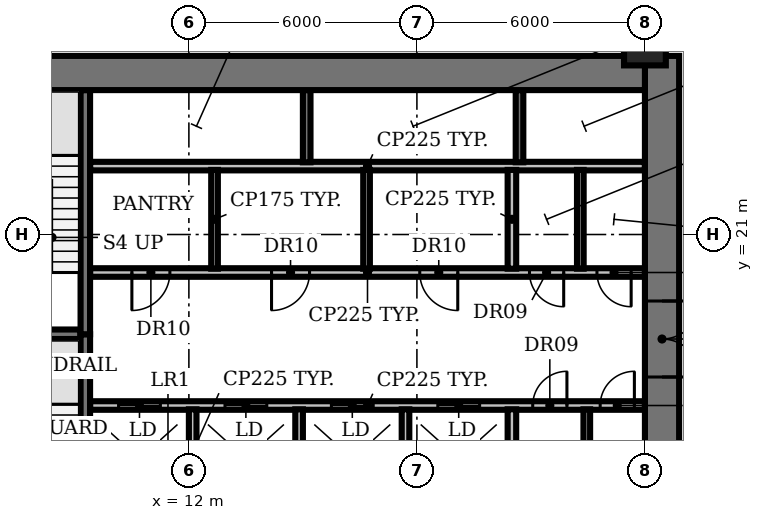
"""IFC4 building model, lengths in metres.
Left out: names, types, materials, properties, quantities, classifications, styles, units other than length and angle.
Written with IfcOpenShell. Run it as: python <this file> out.ifc"""

import sys

from ifc_helpers import new_model, si_unit, direction, frame, frame_2d, origin, origin_2d, place, context, subcontext, project, spatial, rectangle, circle, extrude, element, fill, save


model = new_model("IFC4")
c1 = context("Model", 3, precision=1e-05, world=origin(), true_north=direction((0.0, 1.0)))
c2 = subcontext(c1, "Body", "Model", "MODEL_VIEW")
j1 = project(units=[si_unit("LENGTHUNIT", "METRE"), si_unit("PLANEANGLEUNIT", "RADIAN")], contexts=[c1])
p1 = place(None, origin())
s1 = spatial("IfcSite", under=j1, at=p1, CompositionType="ELEMENT")
p2 = place(p1, origin())
s2 = spatial("IfcBuilding", under=s1, at=p2, CompositionType="ELEMENT")
p3 = place(p2, frame((0.0, 0.0, 20.0)))
s3 = spatial("IfcBuildingStorey", under=s2, at=p3, CompositionType="ELEMENT", Elevation=20.0)
p4 = place(p3, frame((24.0, 26.0, 0.0), z_axis=(0.0, 0.0, 1.0), x_axis=(1.0, 0.0, 0.0)))
e1 = element("IfcColumn", 1, at=p4, inside=s3, PredefinedType="COLUMN", context=c2, shape_type="SweptSolid", body=[
    extrude(circle(Radius=0.55, at=origin_2d()), origin(), (0.0, 0.0, 1.0), 4.15),
])
p5 = place(p3, frame((9.4, 16.5, 0.0), z_axis=(0.0, 0.0, 1.0), x_axis=(1.0, 0.0, 0.0)))
e2 = element("IfcWall", 2, at=p5, inside=s3, PredefinedType="PARTITIONING", context=c2, shape_type="SweptSolid", body=[
    extrude(rectangle(XDim=14.6, YDim=0.225, at=frame_2d((7.3, 0.0))), origin(), (0.0, 0.0, 1.0), 4.15),
])
p6 = place(p5, frame((0.75, 0.0, 0.0)))
e3 = element("IfcOpeningElement", 3, at=p6, cuts=e2, PredefinedType="OPENING", context=c2, shape_type="SweptSolid", body=[
    extrude(rectangle(XDim=1.1, YDim=2.1, at=frame_2d((0.55, 1.05))), frame((0.0, 0.123, 0.0), z_axis=(0.0, -1.0, 0.0), x_axis=(1.0, 0.0, 0.0)), (0.0, 0.0, 1.0), 0.245),
])
p7 = place(p5, frame((3.55, 0.0, 0.0)))
e4 = element("IfcOpeningElement", 4, at=p7, cuts=e2, PredefinedType="OPENING", context=c2, shape_type="SweptSolid", body=[
    extrude(rectangle(XDim=1.1, YDim=2.1, at=frame_2d((0.55, 1.05))), frame((0.0, 0.123, 0.0), z_axis=(0.0, -1.0, 0.0), x_axis=(1.0, 0.0, 0.0)), (0.0, 0.0, 1.0), 0.245),
])
p8 = place(p5, frame((6.35, 0.0, 0.0)))
e5 = element("IfcOpeningElement", 5, at=p8, cuts=e2, PredefinedType="OPENING", context=c2, shape_type="SweptSolid", body=[
    extrude(rectangle(XDim=1.1, YDim=2.1, at=frame_2d((0.55, 1.05))), frame((0.0, 0.123, 0.0), z_axis=(0.0, -1.0, 0.0), x_axis=(1.0, 0.0, 0.0)), (0.0, 0.0, 1.0), 0.245),
])
p9 = place(p5, frame((9.15, 0.0, 0.0)))
e6 = element("IfcOpeningElement", 6, at=p9, cuts=e2, PredefinedType="OPENING", context=c2, shape_type="SweptSolid", body=[
    extrude(rectangle(XDim=1.1, YDim=2.1, at=frame_2d((0.55, 1.05))), frame((0.0, 0.123, 0.0), z_axis=(0.0, -1.0, 0.0), x_axis=(1.0, 0.0, 0.0)), (0.0, 0.0, 1.0), 0.245),
])
p10 = place(p5, frame((11.647, 0.0, 0.0)))
e7 = element("IfcOpeningElement", 7, at=p10, cuts=e2, PredefinedType="OPENING", context=c2, shape_type="SweptSolid", body=[
    extrude(rectangle(XDim=0.9, YDim=2.1, at=frame_2d((0.45, 1.05))), frame((0.0, 0.123, 0.0), z_axis=(0.0, -1.0, 0.0), x_axis=(1.0, 0.0, 0.0)), (0.0, 0.0, 1.0), 0.245),
])
p11 = place(p5, frame((13.423, 0.0, 0.0)))
e8 = element("IfcOpeningElement", 8, at=p11, cuts=e2, PredefinedType="OPENING", context=c2, shape_type="SweptSolid", body=[
    extrude(rectangle(XDim=0.9, YDim=2.1, at=frame_2d((0.45, 1.05))), frame((0.0, 0.123, 0.0), z_axis=(0.0, -1.0, 0.0), x_axis=(1.0, 0.0, 0.0)), (0.0, 0.0, 1.0), 0.245),
])
p12 = place(p3, frame((6.0, 18.375, 0.0), z_axis=(0.0, 0.0, 1.0), x_axis=(1.0, 0.0, 0.0)))
e9 = element("IfcWall", 9, at=p12, inside=s3, PredefinedType="SHEAR", context=c2, shape_type="SweptSolid", body=[
    extrude(rectangle(XDim=3.15, YDim=0.25, at=frame_2d((1.575, 0.0))), origin(), (0.0, 0.0, 1.0), 4.15),
])
p13 = place(p3, frame((24.0, 20.0, 0.0), z_axis=(0.0, 0.0, 1.0), x_axis=(-1.0, 0.0, 0.0)))
e10 = element("IfcWall", 10, at=p13, inside=s3, PredefinedType="PARTITIONING", context=c2, shape_type="SweptSolid", body=[
    extrude(rectangle(XDim=14.6, YDim=0.225, at=frame_2d((7.3, 0.0))), origin(), (0.0, 0.0, 1.0), 4.15),
])
p14 = place(p13, frame((12.5, 0.0, 0.0)))
e11 = element("IfcOpeningElement", 11, at=p14, cuts=e10, PredefinedType="OPENING", context=c2, shape_type="SweptSolid", body=[
    extrude(rectangle(XDim=1.0, YDim=2.1, at=frame_2d((0.5, 1.05))), frame((0.0, 0.123, 0.0), z_axis=(0.0, -1.0, 0.0), x_axis=(1.0, 0.0, 0.0)), (0.0, 0.0, 1.0), 0.245),
])
p15 = place(p13, frame((8.825, 0.0, 0.0)))
e12 = element("IfcOpeningElement", 12, at=p15, cuts=e10, PredefinedType="OPENING", context=c2, shape_type="SweptSolid", body=[
    extrude(rectangle(XDim=1.0, YDim=2.1, at=frame_2d((0.5, 1.05))), frame((0.0, 0.123, 0.0), z_axis=(0.0, -1.0, 0.0), x_axis=(1.0, 0.0, 0.0)), (0.0, 0.0, 1.0), 0.245),
])
p16 = place(p13, frame((4.925, 0.0, 0.0)))
e13 = element("IfcOpeningElement", 13, at=p16, cuts=e10, PredefinedType="OPENING", context=c2, shape_type="SweptSolid", body=[
    extrude(rectangle(XDim=1.0, YDim=2.1, at=frame_2d((0.5, 1.05))), frame((0.0, 0.123, 0.0), z_axis=(0.0, -1.0, 0.0), x_axis=(1.0, 0.0, 0.0)), (0.0, 0.0, 1.0), 0.245),
])
p17 = place(p13, frame((2.137, 0.0, 0.0)))
e14 = element("IfcOpeningElement", 14, at=p17, cuts=e10, PredefinedType="OPENING", context=c2, shape_type="SweptSolid", body=[
    extrude(rectangle(XDim=0.9, YDim=2.1, at=frame_2d((0.45, 1.05))), frame((0.0, 0.123, 0.0), z_axis=(0.0, -1.0, 0.0), x_axis=(1.0, 0.0, 0.0)), (0.0, 0.0, 1.0), 0.245),
])
p18 = place(p13, frame((0.363, 0.0, 0.0)))
e15 = element("IfcOpeningElement", 15, at=p18, cuts=e10, PredefinedType="OPENING", context=c2, shape_type="SweptSolid", body=[
    extrude(rectangle(XDim=0.9, YDim=2.1, at=frame_2d((0.45, 1.05))), frame((0.0, 0.123, 0.0), z_axis=(0.0, -1.0, 0.0), x_axis=(1.0, 0.0, 0.0)), (0.0, 0.0, 1.0), 0.245),
])
p19 = place(p3, frame((9.4, 22.8, 0.0), z_axis=(0.0, 0.0, 1.0), x_axis=(1.0, 0.0, 0.0)))
e16 = element("IfcWall", 16, at=p19, inside=s3, PredefinedType="PARTITIONING", context=c2, shape_type="SweptSolid", body=[
    extrude(rectangle(XDim=14.6, YDim=0.225, at=frame_2d((7.3, 0.0))), origin(), (0.0, 0.0, 1.0), 4.15),
])
p20 = place(p3, frame((9.275, 18.375, 0.0), z_axis=(0.0, 0.0, 1.0), x_axis=(0.0, -1.0, 0.0)))
e17 = element("IfcWall", 17, at=p20, inside=s3, PredefinedType="SHEAR", context=c2, shape_type="SweptSolid", body=[
    extrude(rectangle(XDim=6.55, YDim=0.25, at=frame_2d((3.275, 0.0))), origin(), (0.0, 0.0, 1.0), 4.15),
])
p21 = place(p20, frame((5.075, 0.0, 0.0)))
e18 = element("IfcOpeningElement", 18, at=p21, cuts=e17, PredefinedType="OPENING", context=c2, shape_type="SweptSolid", body=[
    extrude(rectangle(XDim=1.0, YDim=2.1, at=frame_2d((0.5, 1.05))), frame((0.0, 0.135, 0.0), z_axis=(0.0, -1.0, 0.0), x_axis=(1.0, 0.0, 0.0)), (0.0, 0.0, 1.0), 0.27),
])
p22 = place(p3, frame((9.275, 18.375, 0.0), z_axis=(0.0, 0.0, 1.0), x_axis=(0.0, 1.0, 0.0)))
e19 = element("IfcWall", 19, at=p22, inside=s3, PredefinedType="SHEAR", context=c2, shape_type="SweptSolid", body=[
    extrude(rectangle(XDim=6.425, YDim=0.25, at=frame_2d((3.212, 0.0))), origin(), (0.0, 0.0, 1.0), 4.15),
])
p23 = place(p3, frame((12.1, 13.8, 0.0), z_axis=(0.0, 0.0, 1.0), x_axis=(0.0, 1.0, 0.0)))
e20 = element("IfcWall", 20, at=p23, inside=s3, PredefinedType="SOLIDWALL", context=c2, shape_type="SweptSolid", body=[
    extrude(rectangle(XDim=2.6, YDim=0.2, at=frame_2d((1.3, 0.0))), origin(), (0.0, 0.0, 1.0), 4.15),
])
p24 = place(p3, frame((12.675, 20.1, 0.0), z_axis=(0.0, 0.0, 1.0), x_axis=(0.0, 1.0, 0.0)))
e21 = element("IfcWall", 21, at=p24, inside=s3, PredefinedType="PARTITIONING", context=c2, shape_type="SweptSolid", body=[
    extrude(rectangle(XDim=2.6, YDim=0.175, at=frame_2d((1.3, 0.0))), origin(), (0.0, 0.0, 1.0), 4.15),
])
p25 = place(p3, frame((14.9, 13.8, 0.0), z_axis=(0.0, 0.0, 1.0), x_axis=(0.0, 1.0, 0.0)))
e22 = element("IfcWall", 22, at=p25, inside=s3, PredefinedType="SOLIDWALL", context=c2, shape_type="SweptSolid", body=[
    extrude(rectangle(XDim=2.6, YDim=0.2, at=frame_2d((1.3, 0.0))), origin(), (0.0, 0.0, 1.0), 4.15),
])
p26 = place(p3, frame((15.1, 22.9, 0.0), z_axis=(0.0, 0.0, 1.0), x_axis=(0.0, 1.0, 0.0)))
e23 = element("IfcWall", 23, at=p26, inside=s3, PredefinedType="SHEAR", context=c2, shape_type="SweptSolid", body=[
    extrude(rectangle(XDim=1.9, YDim=0.2, at=frame_2d((0.95, 0.0))), origin(), (0.0, 0.0, 1.0), 4.15),
])
p27 = place(p3, frame((16.675, 20.1, 0.0), z_axis=(0.0, 0.0, 1.0), x_axis=(0.0, 1.0, 0.0)))
e24 = element("IfcWall", 24, at=p27, inside=s3, PredefinedType="PARTITIONING", context=c2, shape_type="SweptSolid", body=[
    extrude(rectangle(XDim=2.6, YDim=0.175, at=frame_2d((1.3, 0.0))), origin(), (0.0, 0.0, 1.0), 4.15),
])
p28 = place(p3, frame((17.7, 13.8, 0.0), z_axis=(0.0, 0.0, 1.0), x_axis=(0.0, 1.0, 0.0)))
e25 = element("IfcWall", 25, at=p28, inside=s3, PredefinedType="SOLIDWALL", context=c2, shape_type="SweptSolid", body=[
    extrude(rectangle(XDim=2.6, YDim=0.2, at=frame_2d((1.3, 0.0))), origin(), (0.0, 0.0, 1.0), 4.15),
])
for number, where, z_axis, x_axis in (
    (26, (20.5, 13.8, 0.0), (0.0, 0.0, 1.0), (0.0, 1.0, 0.0)),
    (27, (20.5, 20.1, 0.0), (0.0, 0.0, 1.0), (0.0, 1.0, 0.0)),
):
    element("IfcWall", number, at=place(p3, frame(where, z_axis=z_axis, x_axis=x_axis)), inside=s3, PredefinedType="PARTITIONING", context=c2, shape_type="SweptSolid", body=[
        extrude(rectangle(XDim=2.6, YDim=0.225, at=frame_2d((1.3, 0.0))), origin(), (0.0, 0.0, 1.0), 4.15),
    ])
p29 = place(p3, frame((20.7, 22.9, 0.0), z_axis=(0.0, 0.0, 1.0), x_axis=(0.0, 1.0, 0.0)))
e28 = element("IfcWall", 28, at=p29, inside=s3, PredefinedType="SHEAR", context=c2, shape_type="SweptSolid", body=[
    extrude(rectangle(XDim=1.9, YDim=0.2, at=frame_2d((0.95, 0.0))), origin(), (0.0, 0.0, 1.0), 4.15),
])
for number, where, z_axis, x_axis in (
    (29, (22.3, 20.1, 0.0), (0.0, 0.0, 1.0), (0.0, 1.0, 0.0)),
    (30, (22.47, 13.8, 0.0), (0.0, 0.0, 1.0), (0.0, 1.0, 0.0)),
):
    element("IfcWall", number, at=place(p3, frame(where, z_axis=z_axis, x_axis=x_axis)), inside=s3, PredefinedType="PARTITIONING", context=c2, shape_type="SweptSolid", body=[
        extrude(rectangle(XDim=2.6, YDim=0.175, at=frame_2d((1.3, 0.0))), origin(), (0.0, 0.0, 1.0), 4.15),
    ])
p30 = place(p3, frame((24.45, 25.7, 0.0), z_axis=(0.0, 0.0, 1.0), x_axis=(0.0, -1.0, 0.0)))
e31 = element("IfcWall", 31, at=p30, inside=s3, PredefinedType="SHEAR", context=c2, shape_type="SweptSolid", body=[
    extrude(rectangle(XDim=21.2, YDim=0.9, at=frame_2d((10.6, 0.0))), origin(), (0.0, 0.0, 1.0), 4.15),
])
p31 = place(p30, frame((12.45, 0.0, 0.0)))
e32 = element("IfcOpeningElement", 32, at=p31, cuts=e31, PredefinedType="OPENING", context=c2, shape_type="SweptSolid", body=[
    extrude(rectangle(XDim=0.9, YDim=2.1, at=frame_2d((0.45, 1.05))), frame((0.0, 0.46, 0.0), z_axis=(0.0, -1.0, 0.0), x_axis=(1.0, 0.0, 0.0)), (0.0, 0.0, 1.0), 0.92),
])
p32 = place(p30, frame((6.45, 0.0, 0.0)))
e33 = element("IfcOpeningElement", 33, at=p32, cuts=e31, PredefinedType="OPENING", context=c2, shape_type="SweptSolid", body=[
    extrude(rectangle(XDim=2.0, YDim=2.1, at=frame_2d((1.0, 1.05))), frame((0.0, 0.46, 0.0), z_axis=(0.0, -1.0, 0.0), x_axis=(1.0, 0.0, 0.0)), (0.0, 0.0, 1.0), 0.92),
])
p33 = place(p3, frame((6.0, 25.25, 0.0), z_axis=(0.0, 0.0, 1.0), x_axis=(1.0, 0.0, 0.0)))
e34 = element("IfcWall", 34, at=p33, inside=s3, PredefinedType="SHEAR", context=c2, shape_type="SweptSolid", body=[
    extrude(rectangle(XDim=18.0, YDim=0.9, at=frame_2d((9.0, 0.0))), origin(), (0.0, 0.0, 1.0), 4.15),
])
p34 = place(p6, origin())
e35 = element("IfcDoor", 35, at=p34, inside=s3, OperationType="DOUBLE_DOOR_SLIDING", PredefinedType="DOOR", context=c2, shape_type="SweptSolid", body=[
    extrude(rectangle(XDim=1.1, YDim=2.1, at=frame_2d((0.55, 1.05))), frame((0.0, 0.025, 0.0), z_axis=(0.0, -1.0, 0.0), x_axis=(1.0, 0.0, 0.0)), (0.0, 0.0, 1.0), 0.05),
])
fill(e3, e35)
p35 = place(p7, origin())
e36 = element("IfcDoor", 36, at=p35, inside=s3, OperationType="DOUBLE_DOOR_SLIDING", PredefinedType="DOOR", context=c2, shape_type="SweptSolid", body=[
    extrude(rectangle(XDim=1.1, YDim=2.1, at=frame_2d((0.55, 1.05))), frame((0.0, 0.025, 0.0), z_axis=(0.0, -1.0, 0.0), x_axis=(1.0, 0.0, 0.0)), (0.0, 0.0, 1.0), 0.05),
])
fill(e4, e36)
p36 = place(p8, origin())
e37 = element("IfcDoor", 37, at=p36, inside=s3, OperationType="DOUBLE_DOOR_SLIDING", PredefinedType="DOOR", context=c2, shape_type="SweptSolid", body=[
    extrude(rectangle(XDim=1.1, YDim=2.1, at=frame_2d((0.55, 1.05))), frame((0.0, 0.025, 0.0), z_axis=(0.0, -1.0, 0.0), x_axis=(1.0, 0.0, 0.0)), (0.0, 0.0, 1.0), 0.05),
])
fill(e5, e37)
p37 = place(p9, origin())
e38 = element("IfcDoor", 38, at=p37, inside=s3, OperationType="DOUBLE_DOOR_SLIDING", PredefinedType="DOOR", context=c2, shape_type="SweptSolid", body=[
    extrude(rectangle(XDim=1.1, YDim=2.1, at=frame_2d((0.55, 1.05))), frame((0.0, 0.025, 0.0), z_axis=(0.0, -1.0, 0.0), x_axis=(1.0, 0.0, 0.0)), (0.0, 0.0, 1.0), 0.05),
])
fill(e6, e38)
p38 = place(p10, origin())
e39 = element("IfcDoor", 39, at=p38, inside=s3, OperationType="SINGLE_SWING_RIGHT", PredefinedType="DOOR", context=c2, shape_type="SweptSolid", body=[
    extrude(rectangle(XDim=0.9, YDim=2.1, at=frame_2d((0.45, 1.05))), frame((0.0, 0.025, 0.0), z_axis=(0.0, -1.0, 0.0), x_axis=(1.0, 0.0, 0.0)), (0.0, 0.0, 1.0), 0.05),
])
fill(e7, e39)
p39 = place(p11, origin())
e40 = element("IfcDoor", 40, at=p39, inside=s3, OperationType="SINGLE_SWING_RIGHT", PredefinedType="DOOR", context=c2, shape_type="SweptSolid", body=[
    extrude(rectangle(XDim=0.9, YDim=2.1, at=frame_2d((0.45, 1.05))), frame((0.0, 0.025, 0.0), z_axis=(0.0, -1.0, 0.0), x_axis=(1.0, 0.0, 0.0)), (0.0, 0.0, 1.0), 0.05),
])
fill(e8, e40)
p40 = place(p14, origin())
e41 = element("IfcDoor", 41, at=p40, inside=s3, OperationType="SINGLE_SWING_RIGHT", PredefinedType="DOOR", context=c2, shape_type="SweptSolid", body=[
    extrude(rectangle(XDim=1.0, YDim=2.1, at=frame_2d((0.5, 1.05))), frame((0.0, 0.025, 0.0), z_axis=(0.0, -1.0, 0.0), x_axis=(1.0, 0.0, 0.0)), (0.0, 0.0, 1.0), 0.05),
])
fill(e11, e41)
p41 = place(p15, origin())
e42 = element("IfcDoor", 42, at=p41, inside=s3, OperationType="SINGLE_SWING_RIGHT", PredefinedType="DOOR", context=c2, shape_type="SweptSolid", body=[
    extrude(rectangle(XDim=1.0, YDim=2.1, at=frame_2d((0.5, 1.05))), frame((0.0, 0.025, 0.0), z_axis=(0.0, -1.0, 0.0), x_axis=(1.0, 0.0, 0.0)), (0.0, 0.0, 1.0), 0.05),
])
fill(e12, e42)
p42 = place(p16, origin())
e43 = element("IfcDoor", 43, at=p42, inside=s3, OperationType="SINGLE_SWING_LEFT", PredefinedType="DOOR", context=c2, shape_type="SweptSolid", body=[
    extrude(rectangle(XDim=1.0, YDim=2.1, at=frame_2d((0.5, 1.05))), frame((0.0, 0.025, 0.0), z_axis=(0.0, -1.0, 0.0), x_axis=(1.0, 0.0, 0.0)), (0.0, 0.0, 1.0), 0.05),
])
fill(e13, e43)
p43 = place(p17, origin())
e44 = element("IfcDoor", 44, at=p43, inside=s3, OperationType="SINGLE_SWING_LEFT", PredefinedType="DOOR", context=c2, shape_type="SweptSolid", body=[
    extrude(rectangle(XDim=0.9, YDim=2.1, at=frame_2d((0.45, 1.05))), frame((0.0, 0.025, 0.0), z_axis=(0.0, -1.0, 0.0), x_axis=(1.0, 0.0, 0.0)), (0.0, 0.0, 1.0), 0.05),
])
fill(e14, e44)
p44 = place(p18, origin())
e45 = element("IfcDoor", 45, at=p44, inside=s3, OperationType="SINGLE_SWING_LEFT", PredefinedType="DOOR", context=c2, shape_type="SweptSolid", body=[
    extrude(rectangle(XDim=0.9, YDim=2.1, at=frame_2d((0.45, 1.05))), frame((0.0, 0.025, 0.0), z_axis=(0.0, -1.0, 0.0), x_axis=(1.0, 0.0, 0.0)), (0.0, 0.0, 1.0), 0.05),
])
fill(e15, e45)
p45 = place(p32, origin())
e46 = element("IfcDoor", 46, at=p45, inside=s3, OperationType="DOUBLE_DOOR_SINGLE_SWING", PredefinedType="DOOR", context=c2, shape_type="SweptSolid", body=[
    extrude(rectangle(XDim=2.0, YDim=2.1, at=frame_2d((1.0, 1.05))), frame((0.0, 0.025, 0.0), z_axis=(0.0, -1.0, 0.0), x_axis=(1.0, 0.0, 0.0)), (0.0, 0.0, 1.0), 0.05),
])
fill(e33, e46)
save(model, sys.argv[1])
